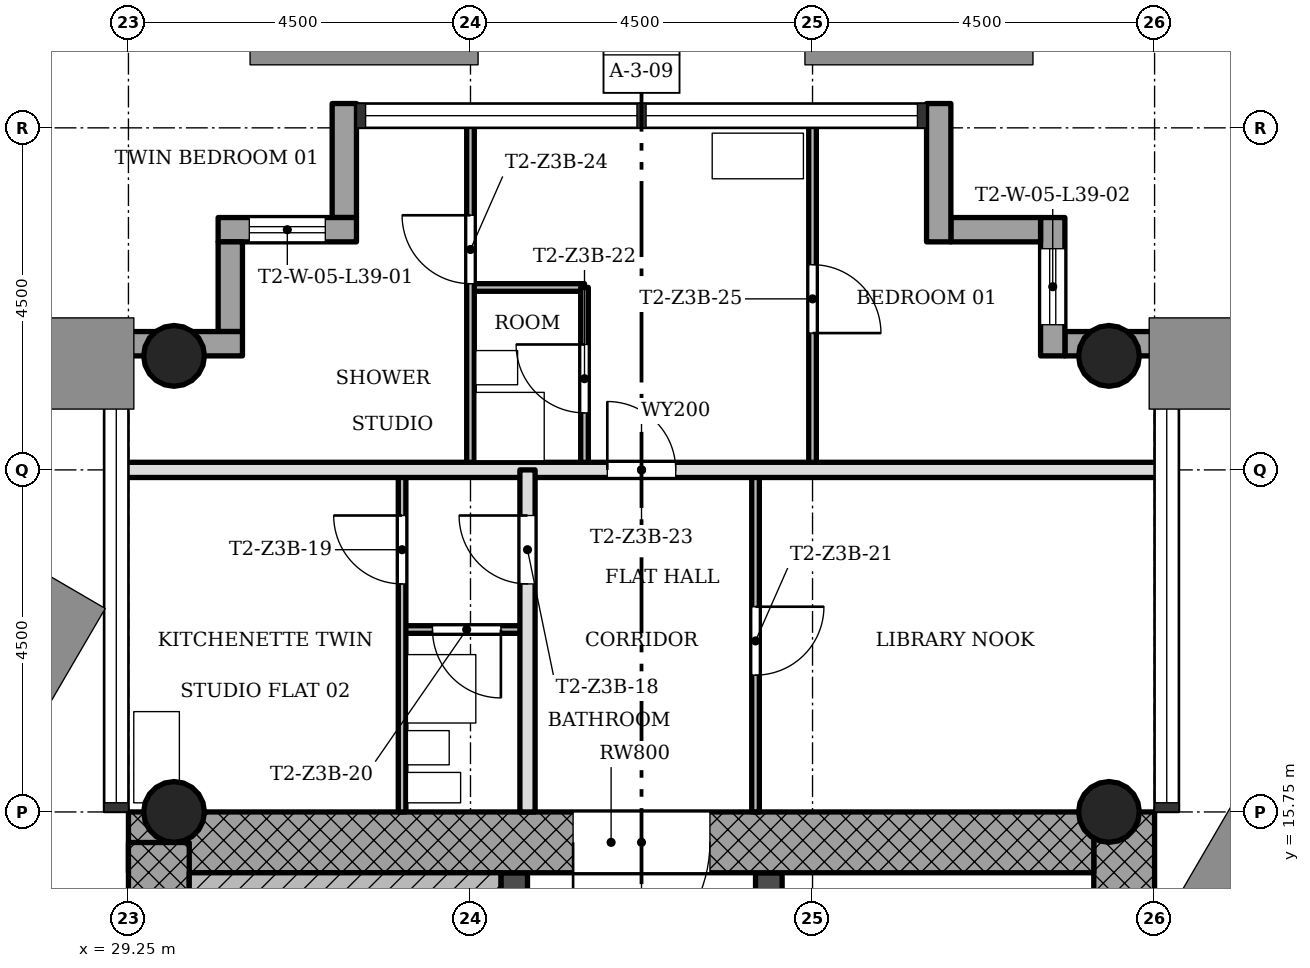
"""IFC4 building model, lengths in metres.
Left out: names, types, materials, properties, quantities, classifications, styles, units other than length and angle.
Written with IfcOpenShell. Run it as: python <this file> out.ifc"""

import sys

from ifc_helpers import new_model, si_unit, direction, frame, frame_2d, origin, origin_2d, place, context, subcontext, project, spatial, rectangle, hollow_circle, extrude, element, fill, save


model = new_model("IFC4")
c1 = context("Model", 3, precision=1e-05, world=origin(), true_north=direction((0.0, 1.0)))
c2 = subcontext(c1, "Body", "Model", "MODEL_VIEW")
j1 = project(units=[si_unit("LENGTHUNIT", "METRE"), si_unit("PLANEANGLEUNIT", "RADIAN")], contexts=[c1])
p1 = place(None, origin())
s1 = spatial("IfcSite", under=j1, at=p1, CompositionType="ELEMENT")
p2 = place(p1, origin())
s2 = spatial("IfcBuilding", under=s1, at=p2, CompositionType="ELEMENT")
p3 = place(p2, frame((0.0, 0.0, 143.9)))
s3 = spatial("IfcBuildingStorey", under=s2, at=p3, CompositionType="ELEMENT", Elevation=143.9)
p4 = place(p3, frame((42.35, 7.55, 0.0), z_axis=(0.0, 0.0, 1.0), x_axis=(0.0, 1.0, 0.0)))
e1 = element("IfcWall", 1, at=p4, inside=s3, PredefinedType="SHEAR", context=c2, shape_type="SweptSolid", body=[
    extrude(rectangle(XDim=8.2, YDim=0.8, at=frame_2d((4.1, 0.0))), origin(), (0.0, 0.0, 1.0), 3.4),
])
p5 = place(p3, frame((41.95, 15.35, 0.0), z_axis=(0.0, 0.0, 1.0), x_axis=(-1.0, 0.0, 0.0)))
e2 = element("IfcWall", 2, at=p5, inside=s3, PredefinedType="SHEAR", context=c2, shape_type="SweptSolid", body=[
    extrude(rectangle(XDim=12.7, YDim=0.8, at=frame_2d((6.35, 0.0))), origin(), (0.0, 0.0, 1.0), 3.4),
])
p6 = place(p5, frame((5.05, 0.0, 0.0)))
e3 = element("IfcOpeningElement", 3, at=p6, cuts=e2, PredefinedType="OPENING", context=c2, shape_type="SweptSolid", body=[
    extrude(rectangle(XDim=1.8, YDim=2.1, at=frame_2d((0.9, 1.05))), frame((0.0, 0.41, 0.0), z_axis=(0.0, -1.0, 0.0), x_axis=(1.0, 0.0, 0.0)), (0.0, 0.0, 1.0), 0.82),
])
p7 = place(p3, frame((29.65, 15.348, 0.0), z_axis=(0.0, 0.0, 1.0), x_axis=(0.0, -1.0, 0.0)))
e4 = element("IfcWall", 4, at=p7, inside=s3, PredefinedType="SHEAR", context=c2, shape_type="SweptSolid", body=[
    extrude(rectangle(XDim=8.796, YDim=0.8, at=frame_2d((4.398, 0.0))), origin(), (0.0, 0.0, 1.0), 3.4),
])
p8 = place(p3, frame((34.325, 7.55, 0.0), z_axis=(0.0, 0.0, 1.0), x_axis=(0.0, 1.0, 0.0)))
e5 = element("IfcWall", 5, at=p8, inside=s3, PredefinedType="SHEAR", context=c2, shape_type="SweptSolid", body=[
    extrude(rectangle(XDim=7.4, YDim=0.35, at=frame_2d((3.7, 0.0))), origin(), (0.0, 0.0, 1.0), 3.4),
])
p9 = place(p8, frame((0.85, 0.0, 0.0)))
e6 = element("IfcOpeningElement", 6, at=p9, cuts=e5, PredefinedType="OPENING", context=c2, shape_type="SweptSolid", body=[
    extrude(rectangle(XDim=0.9, YDim=2.1, at=frame_2d((0.45, 1.05))), frame((0.0, 0.185, 0.0), z_axis=(0.0, -1.0, 0.0), x_axis=(1.0, 0.0, 0.0)), (0.0, 0.0, 1.0), 0.37),
])
p10 = place(p3, frame((37.675, 7.55, 0.0), z_axis=(0.0, 0.0, 1.0), x_axis=(0.0, 1.0, 0.0)))
e7 = element("IfcWall", 7, at=p10, inside=s3, PredefinedType="SHEAR", context=c2, shape_type="SweptSolid", body=[
    extrude(rectangle(XDim=7.4, YDim=0.35, at=frame_2d((3.7, 0.0))), origin(), (0.0, 0.0, 1.0), 3.4),
])
p11 = place(p10, frame((0.95, 0.0, 0.0)))
e8 = element("IfcOpeningElement", 8, at=p11, cuts=e7, PredefinedType="OPENING", context=c2, shape_type="SweptSolid", body=[
    extrude(rectangle(XDim=1.1, YDim=2.1, at=frame_2d((0.55, 1.05))), frame((0.0, 0.185, 0.0), z_axis=(0.0, -1.0, 0.0), x_axis=(1.0, 0.0, 0.0)), (0.0, 0.0, 1.0), 0.37),
])
p12 = place(p10, frame((3.15, 0.0, 0.0)))
e9 = element("IfcOpeningElement", 9, at=p12, cuts=e7, PredefinedType="OPENING", context=c2, shape_type="SweptSolid", body=[
    extrude(rectangle(XDim=1.1, YDim=2.1, at=frame_2d((0.55, 1.05))), frame((0.0, 0.185, 0.0), z_axis=(0.0, -1.0, 0.0), x_axis=(1.0, 0.0, 0.0)), (0.0, 0.0, 1.0), 0.37),
])
p13 = place(p10, frame((5.35, 0.0, 0.0)))
e10 = element("IfcOpeningElement", 10, at=p13, cuts=e7, PredefinedType="OPENING", context=c2, shape_type="SweptSolid", body=[
    extrude(rectangle(XDim=1.1, YDim=2.1, at=frame_2d((0.55, 1.05))), frame((0.0, 0.185, 0.0), z_axis=(0.0, -1.0, 0.0), x_axis=(1.0, 0.0, 0.0)), (0.0, 0.0, 1.0), 0.37),
])
for number, where, z_axis, x_axis in (
    (11, (42.15, 15.75, 0.0), (0.0, 0.0, 1.0), (1.0, 0.0, 0.0)),
    (12, (29.85, 15.75, 0.0), (0.0, 0.0, 1.0), (1.0, 0.0, 0.0)),
    (13, (42.15, 21.75, 0.0), (0.0, 0.0, 1.0), (1.0, 0.0, 0.0)),
    (14, (29.85, 21.75, 0.0), (0.0, 0.0, 1.0), (1.0, 0.0, 0.0)),
):
    element("IfcColumn", number, at=place(p3, frame(where, z_axis=z_axis, x_axis=x_axis)), inside=s3, PredefinedType="COLUMN", context=c2, shape_type="SweptSolid", body=[
        extrude(hollow_circle(Radius=0.4, WallThickness=0.028, at=origin_2d()), origin(), (0.0, 0.0, 1.0), 3.4),
    ])
p14 = place(p3, frame((43.07, 21.91, -0.3), z_axis=(0.0, 0.0, 1.0), x_axis=(-1.0, 0.0, 0.0)))
e15 = element("IfcWall", 15, at=p14, inside=s3, PredefinedType="STANDARD", context=c2, shape_type="SweptSolid", body=[
    extrude(rectangle(XDim=1.5, YDim=0.32, at=frame_2d((0.75, 0.0))), origin(), (0.0, 0.0, 1.0), 3.4),
])
p15 = place(p3, frame((41.41, 21.75, -0.3), z_axis=(0.0, 0.0, 1.0), x_axis=(0.0, 1.0, 0.0)))
e16 = element("IfcWall", 16, at=p15, inside=s3, PredefinedType="STANDARD", context=c2, shape_type="SweptSolid", body=[
    extrude(rectangle(XDim=1.82, YDim=0.32, at=frame_2d((0.91, 0.0))), origin(), (0.0, 0.0, 1.0), 3.4),
])
p16 = place(p15, frame((0.41, 0.0, 1.2)))
e17 = element("IfcOpeningElement", 17, at=p16, cuts=e16, PredefinedType="OPENING", context=c2, shape_type="SweptSolid", body=[
    extrude(rectangle(XDim=1.0, YDim=1.5, at=frame_2d((0.5, 0.75))), frame((0.0, 0.17, 0.0), z_axis=(0.0, -1.0, 0.0), x_axis=(1.0, 0.0, 0.0)), (0.0, 0.0, 1.0), 0.34),
])
p17 = place(p3, frame((41.25, 23.41, -0.3), z_axis=(0.0, 0.0, 1.0), x_axis=(-1.0, 0.0, 0.0)))
e18 = element("IfcWall", 18, at=p17, inside=s3, PredefinedType="STANDARD", context=c2, shape_type="SweptSolid", body=[
    extrude(rectangle(XDim=1.18, YDim=0.32, at=frame_2d((0.59, 0.0))), origin(), (0.0, 0.0, 1.0), 3.4),
])
p18 = place(p3, frame((39.91, 23.25, -0.3), z_axis=(0.0, 0.0, 1.0), x_axis=(0.0, 1.0, 0.0)))
e19 = element("IfcWall", 19, at=p18, inside=s3, PredefinedType="STANDARD", context=c2, shape_type="SweptSolid", body=[
    extrude(rectangle(XDim=1.82, YDim=0.32, at=frame_2d((0.91, 0.0))), origin(), (0.0, 0.0, 1.0), 3.4),
])
p19 = place(p3, frame((32.09, 25.07, -0.3), z_axis=(0.0, 0.0, 1.0), x_axis=(0.0, -1.0, 0.0)))
e20 = element("IfcWall", 20, at=p19, inside=s3, PredefinedType="STANDARD", context=c2, shape_type="SweptSolid", body=[
    extrude(rectangle(XDim=1.5, YDim=0.32, at=frame_2d((0.75, 0.0))), origin(), (0.0, 0.0, 1.0), 3.4),
])
p20 = place(p3, frame((32.25, 23.41, -0.3), z_axis=(0.0, 0.0, 1.0), x_axis=(-1.0, 0.0, 0.0)))
e21 = element("IfcWall", 21, at=p20, inside=s3, PredefinedType="STANDARD", context=c2, shape_type="SweptSolid", body=[
    extrude(rectangle(XDim=1.82, YDim=0.32, at=frame_2d((0.91, 0.0))), origin(), (0.0, 0.0, 1.0), 3.4),
])
p21 = place(p20, frame((0.41, 0.0, 1.2)))
e22 = element("IfcOpeningElement", 22, at=p21, cuts=e21, PredefinedType="OPENING", context=c2, shape_type="SweptSolid", body=[
    extrude(rectangle(XDim=1.0, YDim=1.5, at=frame_2d((0.5, 0.75))), frame((0.0, 0.17, 0.0), z_axis=(0.0, -1.0, 0.0), x_axis=(1.0, 0.0, 0.0)), (0.0, 0.0, 1.0), 0.34),
])
p22 = place(p3, frame((30.59, 23.25, -0.3), z_axis=(0.0, 0.0, 1.0), x_axis=(0.0, -1.0, 0.0)))
e23 = element("IfcWall", 23, at=p22, inside=s3, PredefinedType="STANDARD", context=c2, shape_type="SweptSolid", body=[
    extrude(rectangle(XDim=1.18, YDim=0.32, at=frame_2d((0.59, 0.0))), origin(), (0.0, 0.0, 1.0), 3.4),
])
p23 = place(p3, frame((30.75, 21.91, -0.3), z_axis=(0.0, 0.0, 1.0), x_axis=(-1.0, 0.0, 0.0)))
e24 = element("IfcWall", 24, at=p23, inside=s3, PredefinedType="STANDARD", context=c2, shape_type="SweptSolid", body=[
    extrude(rectangle(XDim=1.82, YDim=0.32, at=frame_2d((0.91, 0.0))), origin(), (0.0, 0.0, 1.0), 3.4),
])
p24 = place(p3, frame((34.5, 18.15, 0.0), z_axis=(0.0, 0.0, 1.0), x_axis=(-1.0, 0.0, 0.0)))
e25 = element("IfcWall", 25, at=p24, inside=s3, PredefinedType="PARTITIONING", context=c2, shape_type="SweptSolid", body=[
    extrude(rectangle(XDim=1.65, YDim=0.1, at=frame_2d((0.825, 0.0))), origin(), (0.0, 0.0, 1.0), 3.0),
])
p25 = place(p24, frame((0.35, 0.0, 0.0)))
e26 = element("IfcOpeningElement", 26, at=p25, cuts=e25, PredefinedType="OPENING", context=c2, shape_type="SweptSolid", body=[
    extrude(rectangle(XDim=0.9, YDim=2.1, at=frame_2d((0.45, 1.05))), frame((0.0, 0.06, 0.0), z_axis=(0.0, -1.0, 0.0), x_axis=(1.0, 0.0, 0.0)), (0.0, 0.0, 1.0), 0.12),
])
p26 = place(p3, frame((42.85, 20.25, 0.0), z_axis=(0.0, 0.0, 1.0), x_axis=(-1.0, 0.0, 0.0)))
e27 = element("IfcWall", 27, at=p26, inside=s3, PredefinedType="SOLIDWALL", context=c2, shape_type="SweptSolid", body=[
    extrude(rectangle(XDim=13.7, YDim=0.2, at=frame_2d((6.85, 0.0))), origin(), (0.0, 0.0, 1.0), 3.0),
])
p27 = place(p26, frame((6.4, 0.0, 0.0)))
e28 = element("IfcOpeningElement", 28, at=p27, cuts=e27, PredefinedType="OPENING", context=c2, shape_type="SweptSolid", body=[
    extrude(rectangle(XDim=0.9, YDim=2.1, at=frame_2d((0.45, 1.05))), frame((0.0, 0.11, 0.0), z_axis=(0.0, -1.0, 0.0), x_axis=(1.0, 0.0, 0.0)), (0.0, 0.0, 1.0), 0.22),
])
p28 = place(p3, frame((35.25, 22.65, 0.0), z_axis=(0.0, 0.0, 1.0), x_axis=(-1.0, 0.0, 0.0)))
e29 = element("IfcWall", 29, at=p28, inside=s3, PredefinedType="PARTITIONING", context=c2, shape_type="SweptSolid", body=[
    extrude(rectangle(XDim=1.5, YDim=0.1, at=frame_2d((0.75, 0.0))), origin(), (0.0, 0.0, 1.0), 3.0),
])
p29 = place(p3, frame((38.25, 20.25, 0.0), z_axis=(0.0, 0.0, 1.0), x_axis=(0.0, 1.0, 0.0)))
e30 = element("IfcWall", 30, at=p29, inside=s3, PredefinedType="PARTITIONING", context=c2, shape_type="SweptSolid", body=[
    extrude(rectangle(XDim=4.6, YDim=0.1, at=frame_2d((2.3, 0.0))), origin(), (0.0, 0.0, 1.0), 3.0),
])
p30 = place(p29, frame((1.8, 0.0, 0.0)))
e31 = element("IfcOpeningElement", 31, at=p30, cuts=e30, PredefinedType="OPENING", context=c2, shape_type="SweptSolid", body=[
    extrude(rectangle(XDim=0.9, YDim=2.1, at=frame_2d((0.45, 1.05))), frame((0.0, 0.06, 0.0), z_axis=(0.0, -1.0, 0.0), x_axis=(1.0, 0.0, 0.0)), (0.0, 0.0, 1.0), 0.12),
])
p31 = place(p3, frame((37.5, 15.75, 0.0), z_axis=(0.0, 0.0, 1.0), x_axis=(0.0, 1.0, 0.0)))
e32 = element("IfcWall", 32, at=p31, inside=s3, PredefinedType="PARTITIONING", context=c2, shape_type="SweptSolid", body=[
    extrude(rectangle(XDim=4.5, YDim=0.1, at=frame_2d((2.25, 0.0))), origin(), (0.0, 0.0, 1.0), 3.0),
])
p32 = place(p31, frame((1.8, 0.0, 0.0)))
e33 = element("IfcOpeningElement", 33, at=p32, cuts=e32, PredefinedType="OPENING", context=c2, shape_type="SweptSolid", body=[
    extrude(rectangle(XDim=0.9, YDim=2.1, at=frame_2d((0.45, 1.05))), frame((0.0, 0.06, 0.0), z_axis=(0.0, -1.0, 0.0), x_axis=(1.0, 0.0, 0.0)), (0.0, 0.0, 1.0), 0.12),
])
p33 = place(p3, frame((35.25, 20.25, 0.0), z_axis=(0.0, 0.0, 1.0), x_axis=(0.0, 1.0, 0.0)))
e34 = element("IfcWall", 34, at=p33, inside=s3, PredefinedType="PARTITIONING", context=c2, shape_type="SweptSolid", body=[
    extrude(rectangle(XDim=2.4, YDim=0.1, at=frame_2d((1.2, 0.0))), origin(), (0.0, 0.0, 1.0), 3.0),
])
p34 = place(p33, frame((0.75, 0.0, 0.0)))
e35 = element("IfcOpeningElement", 35, at=p34, cuts=e34, PredefinedType="OPENING", context=c2, shape_type="SweptSolid", body=[
    extrude(rectangle(XDim=0.9, YDim=2.1, at=frame_2d((0.45, 1.05))), frame((0.0, 0.06, 0.0), z_axis=(0.0, -1.0, 0.0), x_axis=(1.0, 0.0, 0.0)), (0.0, 0.0, 1.0), 0.12),
])
p35 = place(p3, frame((34.5, 15.75, 0.0), z_axis=(0.0, 0.0, 1.0), x_axis=(0.0, 1.0, 0.0)))
e36 = element("IfcWall", 36, at=p35, inside=s3, PredefinedType="SOLIDWALL", context=c2, shape_type="SweptSolid", body=[
    extrude(rectangle(XDim=4.5, YDim=0.2, at=frame_2d((2.25, 0.0))), origin(), (0.0, 0.0, 1.0), 3.0),
])
p36 = place(p35, frame((3.0, 0.0, 0.0)))
e37 = element("IfcOpeningElement", 37, at=p36, cuts=e36, PredefinedType="OPENING", context=c2, shape_type="SweptSolid", body=[
    extrude(rectangle(XDim=0.9, YDim=2.1, at=frame_2d((0.45, 1.05))), frame((0.0, 0.11, 0.0), z_axis=(0.0, -1.0, 0.0), x_axis=(1.0, 0.0, 0.0)), (0.0, 0.0, 1.0), 0.22),
])
p37 = place(p3, frame((33.75, 20.25, 0.0), z_axis=(0.0, 0.0, 1.0), x_axis=(0.0, 1.0, 0.0)))
e38 = element("IfcWall", 38, at=p37, inside=s3, PredefinedType="PARTITIONING", context=c2, shape_type="SweptSolid", body=[
    extrude(rectangle(XDim=4.6, YDim=0.1, at=frame_2d((2.3, 0.0))), origin(), (0.0, 0.0, 1.0), 3.0),
])
p38 = place(p37, frame((2.45, 0.0, 0.0)))
e39 = element("IfcOpeningElement", 39, at=p38, cuts=e38, PredefinedType="OPENING", context=c2, shape_type="SweptSolid", body=[
    extrude(rectangle(XDim=0.9, YDim=2.1, at=frame_2d((0.45, 1.05))), frame((0.0, 0.06, 0.0), z_axis=(0.0, -1.0, 0.0), x_axis=(1.0, 0.0, 0.0)), (0.0, 0.0, 1.0), 0.12),
])
p39 = place(p3, frame((32.85, 15.75, 0.0), z_axis=(0.0, 0.0, 1.0), x_axis=(0.0, 1.0, 0.0)))
e40 = element("IfcWall", 40, at=p39, inside=s3, PredefinedType="PARTITIONING", context=c2, shape_type="SweptSolid", body=[
    extrude(rectangle(XDim=4.5, YDim=0.1, at=frame_2d((2.25, 0.0))), origin(), (0.0, 0.0, 1.0), 3.0),
])
p40 = place(p39, frame((3.0, 0.0, 0.0)))
e41 = element("IfcOpeningElement", 41, at=p40, cuts=e40, PredefinedType="OPENING", context=c2, shape_type="SweptSolid", body=[
    extrude(rectangle(XDim=0.9, YDim=2.1, at=frame_2d((0.45, 1.05))), frame((0.0, 0.06, 0.0), z_axis=(0.0, -1.0, 0.0), x_axis=(1.0, 0.0, 0.0)), (0.0, 0.0, 1.0), 0.12),
])
p41 = place(p3, frame((34.15, 14.75, 0.0), z_axis=(0.0, 0.0, 1.0), x_axis=(-1.0, 0.0, 0.0)))
e42 = element("IfcWall", 42, at=p41, inside=s3, PredefinedType="SHEAR", context=c2, shape_type="SweptSolid", body=[
    extrude(rectangle(XDim=4.1, YDim=0.4, at=frame_2d((2.05, 0.0))), origin(), (0.0, 0.0, 1.0), 3.4),
])
p42 = place(p36, origin())
e43 = element("IfcDoor", 43, at=p42, inside=s3, OperationType="SINGLE_SWING_LEFT", PredefinedType="DOOR", context=c2, shape_type="SweptSolid", body=[
    extrude(rectangle(XDim=0.9, YDim=2.1, at=frame_2d((0.45, 1.05))), frame((0.0, 0.025, 0.0), z_axis=(0.0, -1.0, 0.0), x_axis=(1.0, 0.0, 0.0)), (0.0, 0.0, 1.0), 0.05),
])
fill(e37, e43)
p43 = place(p40, origin())
e44 = element("IfcDoor", 44, at=p43, inside=s3, OperationType="SINGLE_SWING_LEFT", PredefinedType="DOOR", context=c2, shape_type="SweptSolid", body=[
    extrude(rectangle(XDim=0.9, YDim=2.1, at=frame_2d((0.45, 1.05))), frame((0.0, 0.025, 0.0), z_axis=(0.0, -1.0, 0.0), x_axis=(1.0, 0.0, 0.0)), (0.0, 0.0, 1.0), 0.05),
])
fill(e41, e44)
p44 = place(p25, origin())
e45 = element("IfcDoor", 45, at=p44, inside=s3, OperationType="SINGLE_SWING_RIGHT", PredefinedType="DOOR", context=c2, shape_type="SweptSolid", body=[
    extrude(rectangle(XDim=0.9, YDim=2.1, at=frame_2d((0.45, 1.05))), frame((0.0, 0.025, 0.0), z_axis=(0.0, -1.0, 0.0), x_axis=(1.0, 0.0, 0.0)), (0.0, 0.0, 1.0), 0.05),
])
fill(e26, e45)
p45 = place(p32, origin())
e46 = element("IfcDoor", 46, at=p45, inside=s3, OperationType="SINGLE_SWING_RIGHT", PredefinedType="DOOR", context=c2, shape_type="SweptSolid", body=[
    extrude(rectangle(XDim=0.9, YDim=2.1, at=frame_2d((0.45, 1.05))), frame((0.0, 0.025, 0.0), z_axis=(0.0, -1.0, 0.0), x_axis=(1.0, 0.0, 0.0)), (0.0, 0.0, 1.0), 0.05),
])
fill(e33, e46)
p46 = place(p34, origin())
e47 = element("IfcDoor", 47, at=p46, inside=s3, OperationType="SINGLE_SWING_LEFT", PredefinedType="DOOR", context=c2, shape_type="SweptSolid", body=[
    extrude(rectangle(XDim=0.9, YDim=2.1, at=frame_2d((0.45, 1.05))), frame((0.0, 0.025, 0.0), z_axis=(0.0, -1.0, 0.0), x_axis=(1.0, 0.0, 0.0)), (0.0, 0.0, 1.0), 0.05),
])
fill(e35, e47)
p47 = place(p27, origin())
e48 = element("IfcDoor", 48, at=p47, inside=s3, OperationType="SINGLE_SWING_RIGHT", PredefinedType="DOOR", context=c2, shape_type="SweptSolid", body=[
    extrude(rectangle(XDim=0.9, YDim=2.1, at=frame_2d((0.45, 1.05))), frame((0.0, 0.025, 0.0), z_axis=(0.0, -1.0, 0.0), x_axis=(1.0, 0.0, 0.0)), (0.0, 0.0, 1.0), 0.05),
])
fill(e28, e48)
p48 = place(p38, origin())
e49 = element("IfcDoor", 49, at=p48, inside=s3, OperationType="SINGLE_SWING_LEFT", PredefinedType="DOOR", context=c2, shape_type="SweptSolid", body=[
    extrude(rectangle(XDim=0.9, YDim=2.1, at=frame_2d((0.45, 1.05))), frame((0.0, 0.025, 0.0), z_axis=(0.0, -1.0, 0.0), x_axis=(1.0, 0.0, 0.0)), (0.0, 0.0, 1.0), 0.05),
])
fill(e39, e49)
p49 = place(p30, origin())
e50 = element("IfcDoor", 50, at=p49, inside=s3, OperationType="SINGLE_SWING_LEFT", PredefinedType="DOOR", context=c2, shape_type="SweptSolid", body=[
    extrude(rectangle(XDim=0.9, YDim=2.1, at=frame_2d((0.45, 1.05))), frame((0.0, 0.025, 0.0), z_axis=(0.0, -1.0, 0.0), x_axis=(1.0, 0.0, 0.0)), (0.0, 0.0, 1.0), 0.05),
])
fill(e31, e50)
p50 = place(p6, origin())
e51 = element("IfcDoor", 51, at=p50, inside=s3, OperationType="SINGLE_SWING_LEFT", PredefinedType="DOOR", context=c2, shape_type="SweptSolid", body=[
    extrude(rectangle(XDim=1.8, YDim=2.1, at=frame_2d((0.9, 1.05))), frame((0.0, 0.025, 0.0), z_axis=(0.0, -1.0, 0.0), x_axis=(1.0, 0.0, 0.0)), (0.0, 0.0, 1.0), 0.05),
])
fill(e3, e51)
p51 = place(p21, origin())
e52 = element("IfcWindow", 52, at=p51, inside=s3, PartitioningType="SINGLE_PANEL", PredefinedType="WINDOW", context=c2, shape_type="SweptSolid", body=[
    extrude(rectangle(XDim=1.0, YDim=1.5, at=frame_2d((0.5, 0.75))), frame((0.0, 0.03, 0.0), z_axis=(0.0, -1.0, 0.0), x_axis=(1.0, 0.0, 0.0)), (0.0, 0.0, 1.0), 0.06),
])
fill(e22, e52)
p52 = place(p16, origin())
e53 = element("IfcWindow", 53, at=p52, inside=s3, PartitioningType="SINGLE_PANEL", PredefinedType="WINDOW", context=c2, shape_type="SweptSolid", body=[
    extrude(rectangle(XDim=1.0, YDim=1.5, at=frame_2d((0.5, 0.75))), frame((0.0, 0.03, 0.0), z_axis=(0.0, -1.0, 0.0), x_axis=(1.0, 0.0, 0.0)), (0.0, 0.0, 1.0), 0.06),
])
fill(e17, e53)
save(model, sys.argv[1])
